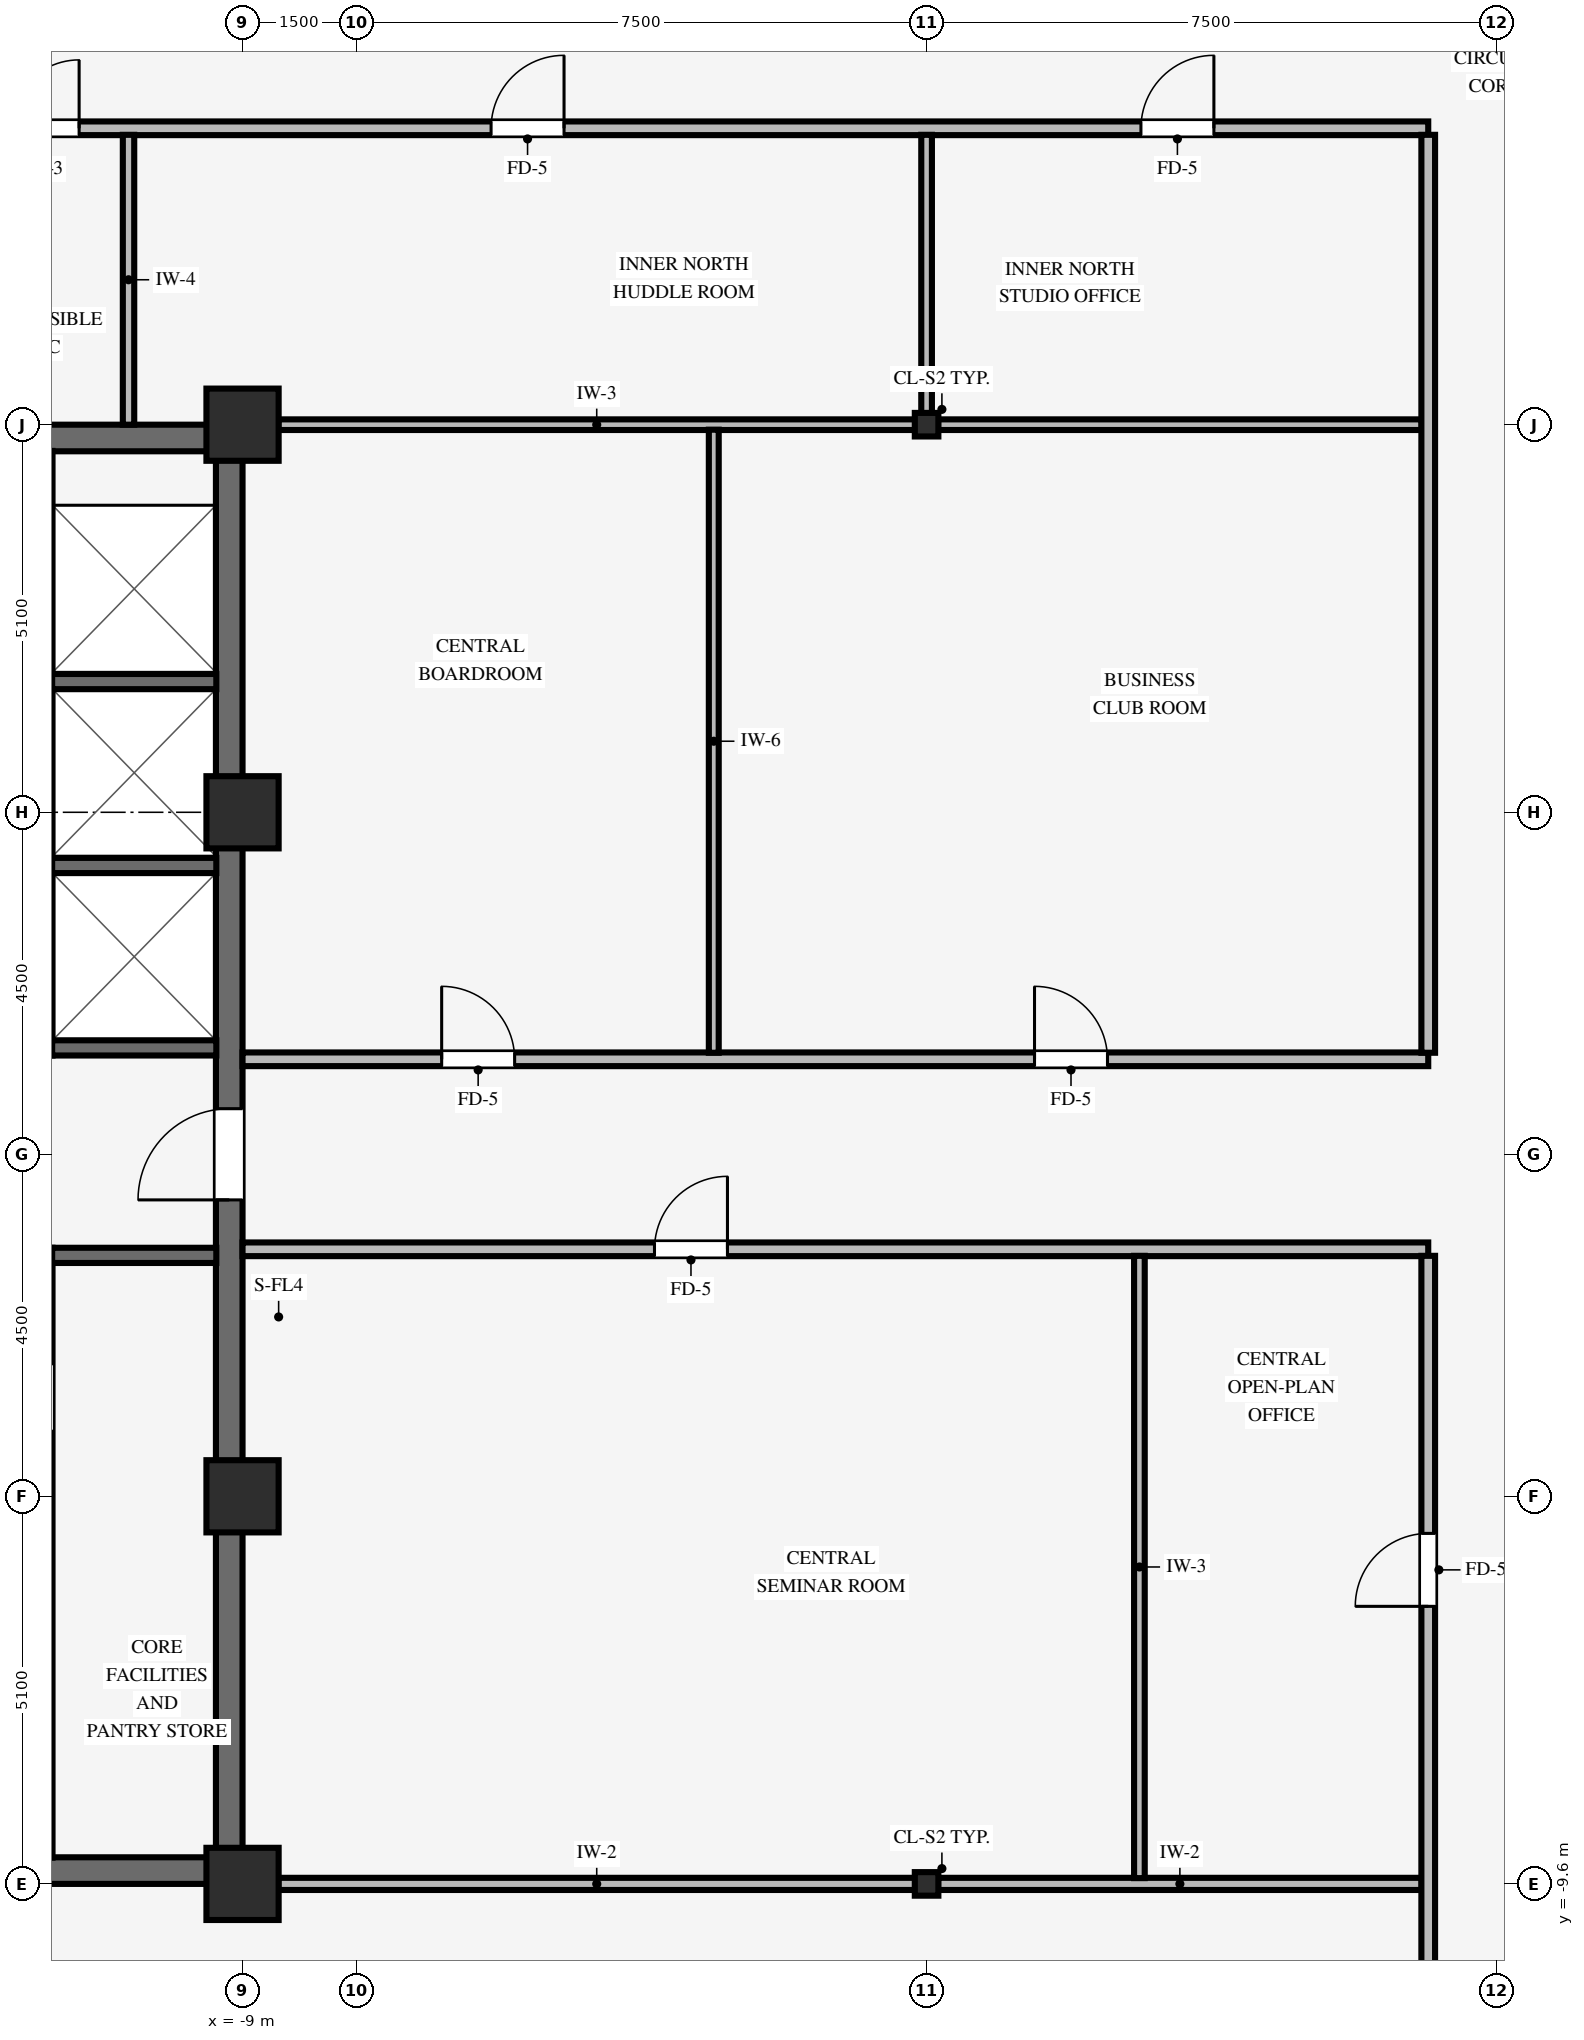
"""IFC4 building model, lengths in metres.
Left out: names, types, materials, properties, quantities, classifications, styles, units other than length and angle.
Written with IfcOpenShell. Run it as: python <this file> out.ifc"""

import sys

from ifc_helpers import new_model, si_unit, direction, frame, frame_2d, origin, origin_2d, place, context, subcontext, project, spatial, rectangle, i_section, extrude, source, transform, mapped, element, fill, save


model = new_model("IFC4")
c1 = context("Model", 3, precision=1e-05, world=origin(), true_north=direction((0.0, 1.0)))
c2 = subcontext(c1, "Body", "Model", "MODEL_VIEW")
j1 = project(units=[si_unit("LENGTHUNIT", "METRE"), si_unit("PLANEANGLEUNIT", "RADIAN")], contexts=[c1])
p1 = place(None, origin())
s1 = spatial("IfcSite", under=j1, at=p1, CompositionType="ELEMENT")
p2 = place(p1, origin())
s2 = spatial("IfcBuilding", under=s1, at=p2, CompositionType="ELEMENT")
p3 = place(p2, frame((0.0, 0.0, 190.9)))
s3 = spatial("IfcBuildingStorey", under=s2, at=p3, CompositionType="ELEMENT", Elevation=190.9)
for number, where, z_axis, x_axis in (
    (1, (-17.5, -9.425, 0.0), (0.0, 0.0, 1.0), (1.0, 0.0, 0.0)),
    (2, (-17.5, 9.425, 0.0), (0.0, 0.0, 1.0), (1.0, 0.0, 0.0)),
):
    element("IfcWall", number, at=place(p3, frame(where, z_axis=z_axis, x_axis=x_axis)), inside=s3, PredefinedType="SHEAR", context=c2, shape_type="SweptSolid", body=[
        extrude(rectangle(XDim=8.5, YDim=0.35, at=frame_2d((4.25, 0.0))), origin(), (0.0, 0.0, 1.0), 3.37),
    ])
p4 = place(p3, frame((-9.175, -9.255, 0.0), z_axis=(0.0, 0.0, 1.0), x_axis=(0.0, 1.0, 0.0)))
e3 = element("IfcWall", 3, at=p4, inside=s3, PredefinedType="SHEAR", context=c2, shape_type="SweptSolid", body=[
    extrude(rectangle(XDim=18.51, YDim=0.35, at=frame_2d((9.255, 0.0))), origin(), (0.0, 0.0, 1.0), 3.37),
])
p5 = place(p4, frame((8.655, 0.0, 0.0)))
e4 = element("IfcOpeningElement", 4, at=p5, cuts=e3, PredefinedType="OPENING", context=c2, shape_type="SweptSolid", body=[
    extrude(rectangle(XDim=1.2, YDim=2.15, at=frame_2d((0.6, 1.075))), frame((0.0, 0.185, 0.0), z_axis=(0.0, -1.0, 0.0), x_axis=(1.0, 0.0, 0.0)), (0.0, 0.0, 1.0), 0.37),
])
for number, where, z_axis, x_axis in (
    (5, (-9.0, -9.6, 0.0), (0.0, 0.0, 1.0), (1.0, 0.0, 0.0)),
    (6, (-9.0, -4.5, 0.0), (0.0, 0.0, 1.0), (1.0, 0.0, 0.0)),
    (7, (-9.0, 4.5, 0.0), (0.0, 0.0, 1.0), (1.0, 0.0, 0.0)),
    (8, (-9.0, 9.6, 0.0), (0.0, 0.0, 1.0), (1.0, 0.0, 0.0)),
):
    element("IfcColumn", number, at=place(p3, frame(where, z_axis=z_axis, x_axis=x_axis)), inside=s3, PredefinedType="COLUMN", context=c2, shape_type="SweptSolid", body=[
        extrude(rectangle(XDim=0.95, YDim=0.95, at=origin_2d()), origin(), (0.0, 0.0, 1.0), 3.37),
    ])
for number, where, z_axis, x_axis in (
    (9, (0.0, -9.6, 0.0), (0.0, 0.0, 1.0), (1.0, 0.0, 0.0)),
    (10, (0.0, 9.6, 0.0), (0.0, 0.0, 1.0), (1.0, 0.0, 0.0)),
):
    element("IfcColumn", number, at=place(p3, frame(where, z_axis=z_axis, x_axis=x_axis)), inside=s3, PredefinedType="COLUMN", context=c2, shape_type="SweptSolid", body=[
        extrude(i_section(OverallWidth=0.31, OverallDepth=0.31, WebThickness=0.015, FlangeThickness=0.015, FilletRadius=0.015, at=origin_2d()), origin(), (0.0, 0.0, 1.0), 3.37),
    ])
for number, where, z_axis, x_axis in (
    (11, (-11.505, -1.33, 0.0), (0.0, 0.0, 1.0), (1.0, 0.0, 0.0)),
    (12, (-11.505, 1.4, 0.0), (0.0, 0.0, 1.0), (1.0, 0.0, 0.0)),
    (13, (-11.505, 3.8, 0.0), (0.0, 0.0, 1.0), (1.0, 0.0, 0.0)),
    (14, (-11.505, 6.22, 0.0), (0.0, 0.0, 1.0), (1.0, 0.0, 0.0)),
):
    element("IfcWall", number, at=place(p3, frame(where, z_axis=z_axis, x_axis=x_axis)), inside=s3, PredefinedType="SHEAR", context=c2, shape_type="SweptSolid", body=[
        extrude(rectangle(XDim=2.16, YDim=0.2, at=frame_2d((1.08, 0.0))), origin(), (0.0, 0.0, 1.0), 3.37),
    ])
p6 = place(p3, frame((-8.529, -9.6, 0.0), z_axis=(0.0, 0.0, 1.0), x_axis=(1.0, 0.0, 0.0)))
e15 = element("IfcWall", 15, at=p6, inside=s3, PredefinedType="PARTITIONING", context=c2, shape_type="SweptSolid", body=[
    extrude(rectangle(XDim=8.378, YDim=0.16, at=frame_2d((4.189, 0.0))), origin(), (0.0, 0.0, 1.0), 2.405),
])
p7 = place(p3, frame((0.151, -9.6, 0.0), z_axis=(0.0, 0.0, 1.0), x_axis=(1.0, 0.0, 0.0)))
e16 = element("IfcWall", 16, at=p7, inside=s3, PredefinedType="PARTITIONING", context=c2, shape_type="SweptSolid", body=[
    extrude(rectangle(XDim=6.363, YDim=0.16, at=frame_2d((3.182, 0.0))), origin(), (0.0, 0.0, 1.0), 2.405),
])
p8 = place(p3, frame((-9.0, -1.25, 0.0), z_axis=(0.0, 0.0, 1.0), x_axis=(1.0, 0.0, 0.0)))
e17 = element("IfcWall", 17, at=p8, inside=s3, PredefinedType="PARTITIONING", context=c2, shape_type="SweptSolid", body=[
    extrude(rectangle(XDim=15.6, YDim=0.18, at=frame_2d((7.8, 0.0))), origin(), (0.0, 0.0, 1.0), 3.36),
])
p9 = place(p8, frame((5.42, 0.0, 0.0)))
e18 = element("IfcOpeningElement", 18, at=p9, cuts=e17, PredefinedType="OPENING", context=c2, shape_type="SweptSolid", body=[
    extrude(rectangle(XDim=0.96, YDim=2.1, at=frame_2d((0.48, 1.05))), frame((0.0, 0.1, 0.0), z_axis=(0.0, -1.0, 0.0), x_axis=(1.0, 0.0, 0.0)), (0.0, 0.0, 1.0), 0.2),
])
p10 = place(p3, frame((-9.0, 1.25, 0.0), z_axis=(0.0, 0.0, 1.0), x_axis=(1.0, 0.0, 0.0)))
e19 = element("IfcWall", 19, at=p10, inside=s3, PredefinedType="PARTITIONING", context=c2, shape_type="SweptSolid", body=[
    extrude(rectangle(XDim=15.6, YDim=0.18, at=frame_2d((7.8, 0.0))), origin(), (0.0, 0.0, 1.0), 3.36),
])
p11 = place(p10, frame((10.42, 0.0, 0.0)))
e20 = element("IfcOpeningElement", 20, at=p11, cuts=e19, PredefinedType="OPENING", context=c2, shape_type="SweptSolid", body=[
    extrude(rectangle(XDim=0.96, YDim=2.1, at=frame_2d((0.48, 1.05))), frame((0.0, 0.1, 0.0), z_axis=(0.0, -1.0, 0.0), x_axis=(1.0, 0.0, 0.0)), (0.0, 0.0, 1.0), 0.2),
])
p12 = place(p10, frame((2.62, 0.0, 0.0)))
e21 = element("IfcOpeningElement", 21, at=p12, cuts=e19, PredefinedType="OPENING", context=c2, shape_type="SweptSolid", body=[
    extrude(rectangle(XDim=0.96, YDim=2.1, at=frame_2d((0.48, 1.05))), frame((0.0, 0.1, 0.0), z_axis=(0.0, -1.0, 0.0), x_axis=(1.0, 0.0, 0.0)), (0.0, 0.0, 1.0), 0.2),
])
p13 = place(p3, frame((-8.529, 9.6, 0.0), z_axis=(0.0, 0.0, 1.0), x_axis=(1.0, 0.0, 0.0)))
e22 = element("IfcWall", 22, at=p13, inside=s3, PredefinedType="PARTITIONING", context=c2, shape_type="SweptSolid", body=[
    extrude(rectangle(XDim=8.378, YDim=0.14, at=frame_2d((4.189, 0.0))), origin(), (0.0, 0.0, 1.0), 2.405),
])
p14 = place(p3, frame((0.151, 9.6, 0.0), z_axis=(0.0, 0.0, 1.0), x_axis=(1.0, 0.0, 0.0)))
e23 = element("IfcWall", 23, at=p14, inside=s3, PredefinedType="PARTITIONING", context=c2, shape_type="SweptSolid", body=[
    extrude(rectangle(XDim=6.363, YDim=0.14, at=frame_2d((3.182, 0.0))), origin(), (0.0, 0.0, 1.0), 2.405),
])
p15 = place(p3, frame((-17.7, 13.5, 0.0), z_axis=(0.0, 0.0, 1.0), x_axis=(1.0, 0.0, 0.0)))
e24 = element("IfcWall", 24, at=p15, inside=s3, PredefinedType="PARTITIONING", context=c2, shape_type="SweptSolid", body=[
    extrude(rectangle(XDim=24.3, YDim=0.18, at=frame_2d((12.15, 0.0))), origin(), (0.0, 0.0, 1.0), 3.008),
])
p16 = place(p15, frame((11.97, 0.0, 0.0)))
e25 = element("IfcOpeningElement", 25, at=p16, cuts=e24, PredefinedType="OPENING", context=c2, shape_type="SweptSolid", body=[
    extrude(rectangle(XDim=0.96, YDim=2.1, at=frame_2d((0.48, 1.05))), frame((0.0, 0.1, 0.0), z_axis=(0.0, -1.0, 0.0), x_axis=(1.0, 0.0, 0.0)), (0.0, 0.0, 1.0), 0.2),
])
p17 = place(p15, frame((20.52, 0.0, 0.0)))
e26 = element("IfcOpeningElement", 26, at=p17, cuts=e24, PredefinedType="OPENING", context=c2, shape_type="SweptSolid", body=[
    extrude(rectangle(XDim=0.96, YDim=2.1, at=frame_2d((0.48, 1.05))), frame((0.0, 0.1, 0.0), z_axis=(0.0, -1.0, 0.0), x_axis=(1.0, 0.0, 0.0)), (0.0, 0.0, 1.0), 0.2),
])
p18 = place(p15, frame((3.3, 0.0, 0.0)))
e27 = element("IfcOpeningElement", 27, at=p18, cuts=e24, PredefinedType="OPENING", context=c2, shape_type="SweptSolid", body=[
    extrude(rectangle(XDim=0.9, YDim=2.1, at=frame_2d((0.45, 1.05))), frame((0.0, 0.1, 0.0), z_axis=(0.0, -1.0, 0.0), x_axis=(1.0, 0.0, 0.0)), (0.0, 0.0, 1.0), 0.2),
])
p19 = place(p15, frame((5.65, 0.0, 0.0)))
e28 = element("IfcOpeningElement", 28, at=p19, cuts=e24, PredefinedType="OPENING", context=c2, shape_type="SweptSolid", body=[
    extrude(rectangle(XDim=0.9, YDim=2.1, at=frame_2d((0.45, 1.05))), frame((0.0, 0.1, 0.0), z_axis=(0.0, -1.0, 0.0), x_axis=(1.0, 0.0, 0.0)), (0.0, 0.0, 1.0), 0.2),
])
p20 = place(p3, frame((-10.5, 9.6, 0.0), z_axis=(0.0, 0.0, 1.0), x_axis=(0.0, 1.0, 0.0)))
e29 = element("IfcWall", 29, at=p20, inside=s3, PredefinedType="PARTITIONING", context=c2, shape_type="SweptSolid", body=[
    extrude(rectangle(XDim=3.814, YDim=0.15, at=frame_2d((1.907, 0.0))), origin(), (0.0, 0.0, 1.0), 3.36),
])
p21 = place(p3, frame((-2.8, 1.336, 0.0), z_axis=(0.0, 0.0, 1.0), x_axis=(0.0, 1.0, 0.0)))
e30 = element("IfcWall", 30, at=p21, inside=s3, PredefinedType="PARTITIONING", context=c2, shape_type="SweptSolid", body=[
    extrude(rectangle(XDim=8.198, YDim=0.13, at=frame_2d((4.099, 0.0))), origin(), (0.0, 0.0, 1.0), 3.36),
])
p22 = place(p3, frame((0.0, 9.751, 0.0), z_axis=(0.0, 0.0, 1.0), x_axis=(0.0, 1.0, 0.0)))
e31 = element("IfcWall", 31, at=p22, inside=s3, PredefinedType="PARTITIONING", context=c2, shape_type="SweptSolid", body=[
    extrude(rectangle(XDim=3.663, YDim=0.14, at=frame_2d((1.832, 0.0))), origin(), (0.0, 0.0, 1.0), 2.816),
])
p23 = place(p3, frame((2.8, -9.524, 0.0), z_axis=(0.0, 0.0, 1.0), x_axis=(0.0, 1.0, 0.0)))
e32 = element("IfcWall", 32, at=p23, inside=s3, PredefinedType="PARTITIONING", context=c2, shape_type="SweptSolid", body=[
    extrude(rectangle(XDim=8.188, YDim=0.14, at=frame_2d((4.094, 0.0))), origin(), (0.0, 0.0, 1.0), 3.36),
])
p24 = place(p3, frame((6.6, -13.414, 0.0), z_axis=(0.0, 0.0, 1.0), x_axis=(0.0, 1.0, 0.0)))
e33 = element("IfcWall", 33, at=p24, inside=s3, PredefinedType="PARTITIONING", context=c2, shape_type="SweptSolid", body=[
    extrude(rectangle(XDim=12.078, YDim=0.18, at=frame_2d((6.039, 0.0))), origin(), (0.0, 0.0, 1.0), 3.36),
])
p25 = place(p24, frame((7.466, 0.0, 0.0)))
e34 = element("IfcOpeningElement", 34, at=p25, cuts=e33, PredefinedType="OPENING", context=c2, shape_type="SweptSolid", body=[
    extrude(rectangle(XDim=0.96, YDim=2.1, at=frame_2d((0.48, 1.05))), frame((0.0, 0.1, 0.0), z_axis=(0.0, -1.0, 0.0), x_axis=(1.0, 0.0, 0.0)), (0.0, 0.0, 1.0), 0.2),
])
p26 = place(p3, frame((6.6, 1.336, 0.0), z_axis=(0.0, 0.0, 1.0), x_axis=(0.0, 1.0, 0.0)))
e35 = element("IfcWall", 35, at=p26, inside=s3, PredefinedType="PARTITIONING", context=c2, shape_type="SweptSolid", body=[
    extrude(rectangle(XDim=12.078, YDim=0.18, at=frame_2d((6.039, 0.0))), origin(), (0.0, 0.0, 1.0), 3.36),
])
m1 = source(origin(), c2, "Body", "SweptSolid", [
    extrude(rectangle(XDim=1.2, YDim=2.15, at=frame_2d((0.6, 1.075))), frame((0.0, 0.025, 0.0), z_axis=(0.0, -1.0, 0.0), x_axis=(1.0, 0.0, 0.0)), (0.0, 0.0, 1.0), 0.05),
])
p27 = place(p5, origin())
e36 = element("IfcDoor", 36, at=p27, inside=s3, OperationType="SINGLE_SWING_LEFT", PredefinedType="DOOR", context=c2, shape_type="MappedRepresentation", body=[
    mapped(m1, transform((0.0, 0.0, 0.0), scale=1.0)),
])
fill(e4, e36)
m2 = source(origin(), c2, "Body", "SweptSolid", [
    extrude(rectangle(XDim=0.96, YDim=2.1, at=frame_2d((0.48, 1.05))), frame((0.0, 0.025, 0.0), z_axis=(0.0, -1.0, 0.0), x_axis=(1.0, 0.0, 0.0)), (0.0, 0.0, 1.0), 0.05),
])
p28 = place(p9, origin())
e37 = element("IfcDoor", 37, at=p28, inside=s3, OperationType="SINGLE_SWING_RIGHT", PredefinedType="DOOR", context=c2, shape_type="MappedRepresentation", body=[
    mapped(m2, transform((0.0, 0.0, 0.0), scale=1.0)),
])
fill(e18, e37)
p29 = place(p16, origin())
e38 = element("IfcDoor", 38, at=p29, inside=s3, OperationType="SINGLE_SWING_RIGHT", PredefinedType="DOOR", context=c2, shape_type="MappedRepresentation", body=[
    mapped(m2, transform((0.0, 0.0, 0.0), scale=1.0)),
])
fill(e25, e38)
p30 = place(p11, origin())
e39 = element("IfcDoor", 39, at=p30, inside=s3, OperationType="SINGLE_SWING_LEFT", PredefinedType="DOOR", context=c2, shape_type="MappedRepresentation", body=[
    mapped(m2, transform((0.0, 0.0, 0.0), scale=1.0)),
])
fill(e20, e39)
p31 = place(p25, origin())
e40 = element("IfcDoor", 40, at=p31, inside=s3, OperationType="SINGLE_SWING_LEFT", PredefinedType="DOOR", context=c2, shape_type="MappedRepresentation", body=[
    mapped(m2, transform((0.0, 0.0, 0.0), scale=1.0)),
])
fill(e34, e40)
p32 = place(p17, origin())
e41 = element("IfcDoor", 41, at=p32, inside=s3, OperationType="SINGLE_SWING_RIGHT", PredefinedType="DOOR", context=c2, shape_type="MappedRepresentation", body=[
    mapped(m2, transform((0.0, 0.0, 0.0), scale=1.0)),
])
fill(e26, e41)
p33 = place(p12, origin())
e42 = element("IfcDoor", 42, at=p33, inside=s3, OperationType="SINGLE_SWING_LEFT", PredefinedType="DOOR", context=c2, shape_type="MappedRepresentation", body=[
    mapped(m2, transform((0.0, 0.0, 0.0), scale=1.0)),
])
fill(e21, e42)
m3 = source(origin(), c2, "Body", "SweptSolid", [
    extrude(rectangle(XDim=0.9, YDim=2.1, at=frame_2d((0.45, 1.05))), frame((0.0, 0.025, 0.0), z_axis=(0.0, -1.0, 0.0), x_axis=(1.0, 0.0, 0.0)), (0.0, 0.0, 1.0), 0.05),
])
p34 = place(p19, origin())
e43 = element("IfcDoor", 43, at=p34, inside=s3, OperationType="SINGLE_SWING_RIGHT", PredefinedType="DOOR", context=c2, shape_type="MappedRepresentation", body=[
    mapped(m3, transform((0.0, 0.0, 0.0), scale=1.0)),
])
fill(e28, e43)
save(model, sys.argv[1])
